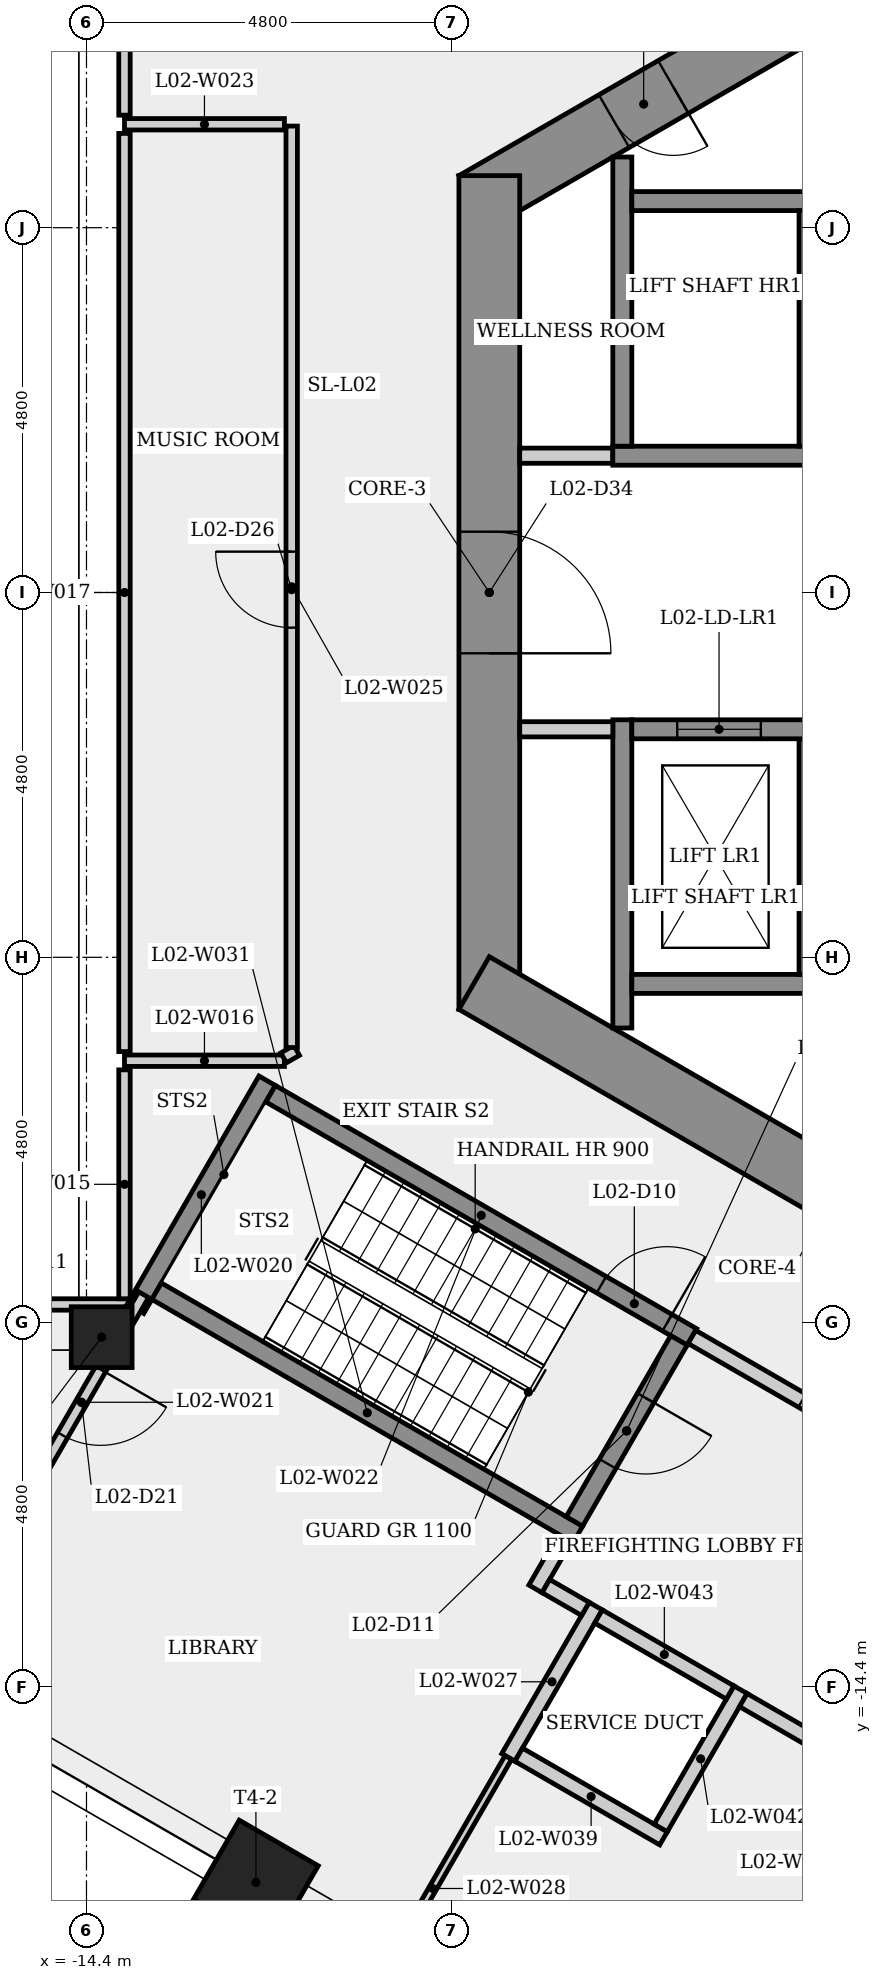
"""IFC4 building model, lengths in metres.
Left out: names, types, materials, properties, quantities, classifications, styles, units other than length and angle.
Written with IfcOpenShell. Run it as: python <this file> out.ifc"""

import sys

from ifc_helpers import new_model, si_unit, direction, frame, frame_2d, origin, origin_2d, place, context, subcontext, project, spatial, rectangle, extrude, element, fill, save


model = new_model("IFC4")
c1 = context("Model", 3, precision=1e-05, world=origin(), true_north=direction((0.0, 1.0)))
c2 = subcontext(c1, "Body", "Model", "MODEL_VIEW")
j1 = project(units=[si_unit("LENGTHUNIT", "METRE"), si_unit("PLANEANGLEUNIT", "RADIAN")], contexts=[c1])
p1 = place(None, origin())
s1 = spatial("IfcSite", under=j1, at=p1, CompositionType="ELEMENT")
p2 = place(p1, origin())
s2 = spatial("IfcBuilding", under=s1, at=p2, CompositionType="ELEMENT")
p3 = place(p2, frame((0.0, 0.0, 11.5)))
s3 = spatial("IfcBuildingStorey", under=s2, at=p3, CompositionType="ELEMENT", Elevation=11.5)
p4 = place(p3, frame((0.2, 10.623, 0.0), z_axis=(0.0, 0.0, 1.0), x_axis=(-0.866023993627, -0.500002442456, 0.0)))
e1 = element("IfcWall", 1, at=p4, inside=s3, PredefinedType="SHEAR", context=c2, shape_type="SweptSolid", body=[
    extrude(rectangle(XDim=10.97, YDim=0.8, at=frame_2d((5.485, 0.0))), origin(), (0.0, 0.0, 1.0), 4.5),
])
p5 = place(p4, frame((7.944, 0.0, 0.0)))
e2 = element("IfcOpeningElement", 2, at=p5, cuts=e1, PredefinedType="OPENING", context=c2, shape_type="SweptSolid", body=[
    extrude(rectangle(XDim=0.9, YDim=2.1, at=frame_2d((0.45, 1.05))), frame((0.0, 0.41, 0.0), z_axis=(0.0, -1.0, 0.0), x_axis=(1.0, 0.0, 0.0)), (0.0, 0.0, 1.0), 0.82),
])
p6 = place(p4, frame((1.86, 0.0, 0.0)))
e3 = element("IfcOpeningElement", 3, at=p6, cuts=e1, PredefinedType="OPENING", context=c2, shape_type="SweptSolid", body=[
    extrude(rectangle(XDim=0.9, YDim=2.1, at=frame_2d((0.45, 1.05))), frame((0.0, 0.41, 0.0), z_axis=(0.0, -1.0, 0.0), x_axis=(1.0, 0.0, 0.0)), (0.0, 0.0, 1.0), 0.82),
])
p7 = place(p3, frame((-9.1, 5.485, 0.0), z_axis=(0.0, 0.0, 1.0), x_axis=(0.0, -1.0, 0.0)))
e4 = element("IfcWall", 4, at=p7, inside=s3, PredefinedType="SHEAR", context=c2, shape_type="SweptSolid", body=[
    extrude(rectangle(XDim=10.97, YDim=0.8, at=frame_2d((5.485, 0.0))), origin(), (0.0, 0.0, 1.0), 4.5),
])
p8 = place(p7, frame((4.685, 0.0, 0.0)))
e5 = element("IfcOpeningElement", 5, at=p8, cuts=e4, PredefinedType="OPENING", context=c2, shape_type="SweptSolid", body=[
    extrude(rectangle(XDim=1.6, YDim=2.1, at=frame_2d((0.8, 1.05))), frame((0.0, 0.41, 0.0), z_axis=(0.0, -1.0, 0.0), x_axis=(1.0, 0.0, 0.0)), (0.0, 0.0, 1.0), 0.82),
])
p9 = place(p3, frame((-9.3, -5.138, 0.0), z_axis=(0.0, 0.0, 1.0), x_axis=(0.866023993627, -0.500002442456, 0.0)))
e6 = element("IfcWall", 6, at=p9, inside=s3, PredefinedType="SHEAR", context=c2, shape_type="SweptSolid", body=[
    extrude(rectangle(XDim=10.97, YDim=0.8, at=frame_2d((5.485, 0.0))), origin(), (0.0, 0.0, 1.0), 4.5),
])
p10 = place(p9, frame((5.74, 0.0, 0.0)))
e7 = element("IfcOpeningElement", 7, at=p10, cuts=e6, PredefinedType="OPENING", context=c2, shape_type="SweptSolid", body=[
    extrude(rectangle(XDim=0.9, YDim=2.1, at=frame_2d((0.45, 1.05))), frame((0.0, 0.41, 0.0), z_axis=(0.0, -1.0, 0.0), x_axis=(1.0, 0.0, 0.0)), (0.0, 0.0, 1.0), 0.82),
])
p11 = place(p3, frame((-12.171, -16.973, 0.0), z_axis=(0.0, 0.0, 1.0), x_axis=(-0.5, -0.866025403784, 0.0)))
e8 = element("IfcColumn", 8, at=p11, inside=s3, PredefinedType="COLUMN", context=c2, shape_type="SweptSolid", body=[
    extrude(rectangle(XDim=1.2, YDim=1.2, at=origin_2d()), origin(), (0.0, 0.0, 1.0), 4.5),
])
p12 = place(p3, frame((-14.2, -9.798, 0.0), z_axis=(0.0, 0.0, 1.0), x_axis=(-1.0, 0.0, 0.0)))
e9 = element("IfcColumn", 9, at=p12, inside=s3, PredefinedType="COLUMN", context=c2, shape_type="SweptSolid", body=[
    extrude(rectangle(XDim=0.8, YDim=0.8, at=origin_2d()), origin(), (0.0, 0.0, 1.0), 4.5),
])
p13 = place(p3, frame((-16.78, -9.368, 0.0), z_axis=(0.0, 0.0, 1.0), x_axis=(1.0, 0.0, 0.0)))
e10 = element("IfcWall", 10, at=p13, inside=s3, PredefinedType="PARTITIONING", context=c2, shape_type="SweptSolid", body=[
    extrude(rectangle(XDim=2.955, YDim=0.15, at=frame_2d((1.478, 0.0))), origin(), (0.0, 0.0, 1.0), 3.175),
])
p14 = place(p3, frame((-13.9, -9.293, 0.0), z_axis=(0.0, 0.0, 1.0), x_axis=(0.0, 1.0, 0.0)))
e11 = element("IfcWall", 11, at=p14, inside=s3, PredefinedType="PARTITIONING", context=c2, shape_type="SweptSolid", body=[
    extrude(rectangle(XDim=3.012, YDim=0.15, at=frame_2d((1.506, 0.0))), origin(), (0.0, 0.0, 1.0), 3.175),
])
p15 = place(p3, frame((-13.9, -6.161, 0.0), z_axis=(0.0, 0.0, 1.0), x_axis=(1.0, 0.0, 0.0)))
e12 = element("IfcWall", 12, at=p15, inside=s3, PredefinedType="PARTITIONING", context=c2, shape_type="SweptSolid", body=[
    extrude(rectangle(XDim=2.104, YDim=0.15, at=frame_2d((1.052, 0.0))), origin(), (0.0, 0.0, 1.0), 4.1),
])
p16 = place(p3, frame((-13.9, -6.041, 0.0), z_axis=(0.0, 0.0, 1.0), x_axis=(0.0, 1.0, 0.0)))
e13 = element("IfcWall", 13, at=p16, inside=s3, PredefinedType="PARTITIONING", context=c2, shape_type="SweptSolid", body=[
    extrude(rectangle(XDim=12.082, YDim=0.15, at=frame_2d((6.041, 0.0))), origin(), (0.0, 0.0, 1.0), 3.175),
])
p17 = place(p3, frame((-13.9, 6.281, 0.0), z_axis=(0.0, 0.0, 1.0), x_axis=(0.0, 1.0, 0.0)))
e14 = element("IfcWall", 14, at=p17, inside=s3, PredefinedType="PARTITIONING", context=c2, shape_type="SweptSolid", body=[
    extrude(rectangle(XDim=3.162, YDim=0.15, at=frame_2d((1.581, 0.0))), origin(), (0.0, 0.0, 1.0), 3.175),
])
p18 = place(p3, frame((-13.755, -9.424, 0.0), z_axis=(0.0, 0.0, 1.0), x_axis=(0.500005140434, 0.866022435933, 0.0)))
e15 = element("IfcWall", 15, at=p18, inside=s3, PredefinedType="SHEAR", context=c2, shape_type="SweptSolid", body=[
    extrude(rectangle(XDim=3.464, YDim=0.25, at=frame_2d((1.732, 0.0))), origin(), (0.0, 0.0, 1.0), 4.1),
])
p19 = place(p3, frame((-13.648, -9.239, 0.0), z_axis=(0.0, 0.0, 1.0), x_axis=(-0.50004125829, -0.866001581989, 0.0)))
e16 = element("IfcWall", 16, at=p19, inside=s3, PredefinedType="PARTITIONING", context=c2, shape_type="SweptSolid", body=[
    extrude(rectangle(XDim=3.27, YDim=0.15, at=frame_2d((1.635, 0.0))), origin(), (0.0, 0.0, 1.0), 4.1),
])
p20 = place(p19, frame((1.135, 0.0, 0.0)))
e17 = element("IfcOpeningElement", 17, at=p20, cuts=e16, PredefinedType="OPENING", context=c2, shape_type="SweptSolid", body=[
    extrude(rectangle(XDim=1.0, YDim=2.1, at=frame_2d((0.5, 1.05))), frame((0.0, 0.085, 0.0), z_axis=(0.0, -1.0, 0.0), x_axis=(1.0, 0.0, 0.0)), (0.0, 0.0, 1.0), 0.17),
])
p21 = place(p3, frame((-11.977, -6.595, 0.0), z_axis=(0.0, 0.0, 1.0), x_axis=(0.866025499775, -0.499999833739, 0.0)))
e18 = element("IfcWall", 18, at=p21, inside=s3, PredefinedType="SHEAR", context=c2, shape_type="SweptSolid", body=[
    extrude(rectangle(XDim=6.4, YDim=0.25, at=frame_2d((3.2, 0.0))), origin(), (0.0, 0.0, 1.0), 4.1),
])
p22 = place(p21, frame((5.025, 0.0, 0.0)))
e19 = element("IfcOpeningElement", 19, at=p22, cuts=e18, PredefinedType="OPENING", context=c2, shape_type="SweptSolid", body=[
    extrude(rectangle(XDim=1.0, YDim=2.1, at=frame_2d((0.5, 1.05))), frame((0.0, 0.135, 0.0), z_axis=(0.0, -1.0, 0.0), x_axis=(1.0, 0.0, 0.0)), (0.0, 0.0, 1.0), 0.27),
])
p23 = place(p3, frame((-11.796, 6.161, 0.0), z_axis=(0.0, 0.0, 1.0), x_axis=(-1.0, 0.0, 0.0)))
e20 = element("IfcWall", 20, at=p23, inside=s3, PredefinedType="PARTITIONING", context=c2, shape_type="SweptSolid", body=[
    extrude(rectangle(XDim=2.104, YDim=0.15, at=frame_2d((1.052, 0.0))), origin(), (0.0, 0.0, 1.0), 4.1),
])
p24 = place(p3, frame((-11.806, -6.123, 0.0), z_axis=(0.0, 0.0, 1.0), x_axis=(0.866103179807, 0.499865263774, 0.0)))
e21 = element("IfcWall", 21, at=p24, inside=s3, PredefinedType="PARTITIONING", context=c2, shape_type="SweptSolid", body=[
    extrude(rectangle(XDim=0.197, YDim=0.15, at=frame_2d((0.099, 0.0))), origin(), (0.0, 0.0, 1.0), 4.1),
])
p25 = place(p3, frame((-11.7, -5.987, 0.0), z_axis=(0.0, 0.0, 1.0), x_axis=(0.0, 1.0, 0.0)))
e22 = element("IfcWall", 22, at=p25, inside=s3, PredefinedType="PARTITIONING", context=c2, shape_type="SweptSolid", body=[
    extrude(rectangle(XDim=12.125, YDim=0.15, at=frame_2d((6.062, 0.0))), origin(), (0.0, 0.0, 1.0), 4.1),
])
p26 = place(p25, frame((5.525, 0.0, 0.0)))
e23 = element("IfcOpeningElement", 23, at=p26, cuts=e22, PredefinedType="OPENING", context=c2, shape_type="SweptSolid", body=[
    extrude(rectangle(XDim=1.0, YDim=2.1, at=frame_2d((0.5, 1.05))), frame((0.0, 0.085, 0.0), z_axis=(0.0, -1.0, 0.0), x_axis=(1.0, 0.0, 0.0)), (0.0, 0.0, 1.0), 0.17),
])
p27 = place(p3, frame((-8.85, -15.329, 0.0), z_axis=(0.0, 0.0, 1.0), x_axis=(0.500077740698, 0.865980515519, 0.0)))
e24 = element("IfcWall", 24, at=p27, inside=s3, PredefinedType="PLUMBINGWALL", context=c2, shape_type="SweptSolid", body=[
    extrude(rectangle(XDim=2.3, YDim=0.2, at=frame_2d((1.15, 0.0))), origin(), (0.0, 0.0, 1.0), 4.1),
])
p28 = place(p3, frame((-8.85, -15.329, 0.0), z_axis=(0.0, 0.0, 1.0), x_axis=(-0.499991453095, -0.866030338286, 0.0)))
e25 = element("IfcWall", 25, at=p28, inside=s3, PredefinedType="PARTITIONING", context=c2, shape_type="SweptSolid", body=[
    extrude(rectangle(XDim=3.98, YDim=0.1, at=frame_2d((1.99, 0.0))), origin(), (0.0, 0.0, 1.0), 4.1),
])
p29 = place(p3, frame((-8.7, 1.8, 0.0), z_axis=(0.0, 0.0, 1.0), x_axis=(1.0, 0.0, 0.0)))
e26 = element("IfcWall", 26, at=p29, inside=s3, PredefinedType="PARTITIONING", context=c2, shape_type="SweptSolid", body=[
    extrude(rectangle(XDim=1.225, YDim=0.2, at=frame_2d((0.613, 0.0))), origin(), (0.0, 0.0, 1.0), 4.1),
])
p30 = place(p3, frame((-8.493, -13.11, 0.0), z_axis=(0.0, 0.0, 1.0), x_axis=(0.500067724834, 0.865986299303, 0.0)))
e27 = element("IfcWall", 27, at=p30, inside=s3, PredefinedType="PARTITIONING", context=c2, shape_type="SweptSolid", body=[
    extrude(rectangle(XDim=0.775, YDim=0.2, at=frame_2d((0.388, 0.0))), origin(), (0.0, 0.0, 1.0), 4.1),
])
p31 = place(p3, frame((-7.935, -12.393, 0.0), z_axis=(0.0, 0.0, 1.0), x_axis=(-0.866025499775, 0.499999833739, 0.0)))
e28 = element("IfcWall", 28, at=p31, inside=s3, PredefinedType="SHEAR", context=c2, shape_type="SweptSolid", body=[
    extrude(rectangle(XDim=6.4, YDim=0.25, at=frame_2d((3.2, 0.0))), origin(), (0.0, 0.0, 1.0), 4.1),
])
p32 = place(p3, frame((-7.836, -13.373, 0.0), z_axis=(0.0, 0.0, 1.0), x_axis=(-0.866232998003, 0.499640263761, 0.0)))
e29 = element("IfcWall", 29, at=p32, inside=s3, PredefinedType="PARTITIONING", context=c2, shape_type="SweptSolid", body=[
    extrude(rectangle(XDim=0.6, YDim=0.2, at=frame_2d((0.3, 0.0))), origin(), (0.0, 0.0, 1.0), 4.1),
])
p33 = place(p3, frame((-7.475, 1.8, 0.0), z_axis=(0.0, 0.0, 1.0), x_axis=(1.0, 0.0, 0.0)))
e30 = element("IfcWall", 30, at=p33, inside=s3, PredefinedType="SHEAR", context=c2, shape_type="SweptSolid", body=[
    extrude(rectangle(XDim=14.95, YDim=0.25, at=frame_2d((7.475, 0.0))), origin(), (0.0, 0.0, 1.0), 4.1),
])
p34 = place(p3, frame((-7.35, -5.73, 0.0), z_axis=(0.0, 0.0, 1.0), x_axis=(0.0, 1.0, 0.0)))
e31 = element("IfcWall", 31, at=p34, inside=s3, PredefinedType="SHEAR", context=c2, shape_type="SweptSolid", body=[
    extrude(rectangle(XDim=4.055, YDim=0.25, at=frame_2d((2.028, 0.0))), origin(), (0.0, 0.0, 1.0), 4.1),
])
p35 = place(p3, frame((-7.35, 1.925, 0.0), z_axis=(0.0, 0.0, 1.0), x_axis=(0.0, 1.0, 0.0)))
e32 = element("IfcWall", 32, at=p35, inside=s3, PredefinedType="SHEAR", context=c2, shape_type="SweptSolid", body=[
    extrude(rectangle(XDim=3.805, YDim=0.25, at=frame_2d((1.903, 0.0))), origin(), (0.0, 0.0, 1.0), 4.1),
])
p36 = place(p3, frame((-7.225, 5.15, 0.0), z_axis=(0.0, 0.0, 1.0), x_axis=(1.0, 0.0, 0.0)))
e33 = element("IfcWall", 33, at=p36, inside=s3, PredefinedType="SHEAR", context=c2, shape_type="SweptSolid", body=[
    extrude(rectangle(XDim=14.7, YDim=0.25, at=frame_2d((7.35, 0.0))), origin(), (0.0, 0.0, 1.0), 4.1),
])
p37 = place(p3, frame((-7.475, -1.8, 0.0), z_axis=(0.0, 0.0, 1.0), x_axis=(-1.0, 0.0, 0.0)))
e34 = element("IfcWall", 34, at=p37, inside=s3, PredefinedType="PARTITIONING", context=c2, shape_type="SweptSolid", body=[
    extrude(rectangle(XDim=1.225, YDim=0.2, at=frame_2d((0.613, 0.0))), origin(), (0.0, 0.0, 1.0), 4.1),
])
p38 = place(p3, frame((-6.808, -16.392, 0.0), z_axis=(0.0, 0.0, 1.0), x_axis=(-0.866008176907, 0.50002983664, 0.0)))
e35 = element("IfcWall", 35, at=p38, inside=s3, PredefinedType="PLUMBINGWALL", context=c2, shape_type="SweptSolid", body=[
    extrude(rectangle(XDim=2.2, YDim=0.2, at=frame_2d((1.1, 0.0))), origin(), (0.0, 0.0, 1.0), 4.1),
])
p39 = place(p3, frame((-6.605, -9.841, 0.0), z_axis=(0.0, 0.0, 1.0), x_axis=(-0.499996545922, -0.866027397988, 0.0)))
e36 = element("IfcWall", 36, at=p39, inside=s3, PredefinedType="SHEAR", context=c2, shape_type="SweptSolid", body=[
    extrude(rectangle(XDim=2.75, YDim=0.25, at=frame_2d((1.375, 0.0))), origin(), (0.0, 0.0, 1.0), 4.1),
])
p40 = place(p39, frame((0.875, 0.0, 0.0)))
e37 = element("IfcOpeningElement", 37, at=p40, cuts=e36, PredefinedType="OPENING", context=c2, shape_type="SweptSolid", body=[
    extrude(rectangle(XDim=1.0, YDim=2.1, at=frame_2d((0.5, 1.05))), frame((0.0, 0.135, 0.0), z_axis=(0.0, -1.0, 0.0), x_axis=(1.0, 0.0, 0.0)), (0.0, 0.0, 1.0), 0.27),
])
p41 = place(p3, frame((-6.435, -9.795, 0.0), z_axis=(0.0, 0.0, 1.0), x_axis=(0.866012907634, -0.500021643343, 0.0)))
e38 = element("IfcWall", 38, at=p41, inside=s3, PredefinedType="PARTITIONING", context=c2, shape_type="SweptSolid", body=[
    extrude(rectangle(XDim=4.45, YDim=0.2, at=frame_2d((2.225, 0.0))), origin(), (0.0, 0.0, 1.0), 4.1),
])
p42 = place(p41, frame((1.675, 0.0, 0.0)))
e39 = element("IfcOpeningElement", 39, at=p42, cuts=e38, PredefinedType="OPENING", context=c2, shape_type="SweptSolid", body=[
    extrude(rectangle(XDim=1.1, YDim=2.1, at=frame_2d((0.55, 1.05))), frame((0.0, 0.11, 0.0), z_axis=(0.0, -1.0, 0.0), x_axis=(1.0, 0.0, 0.0)), (0.0, 0.0, 1.0), 0.22),
])
p43 = place(p3, frame((-5.795, -14.437, 0.0), z_axis=(0.0, 0.0, 1.0), x_axis=(-0.500027713859, -0.866009402589, 0.0)))
e40 = element("IfcWall", 40, at=p43, inside=s3, PredefinedType="PLUMBINGWALL", context=c2, shape_type="SweptSolid", body=[
    extrude(rectangle(XDim=2.1, YDim=0.2, at=frame_2d((1.05, 0.0))), origin(), (0.0, 0.0, 1.0), 4.1),
])
p44 = place(p3, frame((-5.931, -14.473, 0.0), z_axis=(0.0, 0.0, 1.0), x_axis=(-0.866041268327, 0.499972520799, 0.0)))
e41 = element("IfcWall", 41, at=p44, inside=s3, PredefinedType="PLUMBINGWALL", context=c2, shape_type="SweptSolid", body=[
    extrude(rectangle(XDim=2.0, YDim=0.2, at=frame_2d((1.0, 0.0))), origin(), (0.0, 0.0, 1.0), 4.1),
])
p45 = place(p3, frame((-7.225, -5.15, 0.0), z_axis=(0.0, 0.0, 1.0), x_axis=(1.0, 0.0, 0.0)))
e42 = element("IfcWall", 42, at=p45, inside=s3, PredefinedType="SHEAR", context=c2, shape_type="SweptSolid", body=[
    extrude(rectangle(XDim=14.7, YDim=0.25, at=frame_2d((7.35, 0.0))), origin(), (0.0, 0.0, 1.0), 4.1),
])
for number, where, z_axis, x_axis in (
    (43, (-4.9, -1.925, 0.0), (0.0, 0.0, 1.0), (0.0, -1.0, 0.0)),
    (44, (-4.9, 5.025, 0.0), (0.0, 0.0, 1.0), (0.0, -1.0, 0.0)),
):
    element("IfcWall", number, at=place(p3, frame(where, z_axis=z_axis, x_axis=x_axis)), inside=s3, PredefinedType="SHEAR", context=c2, shape_type="SweptSolid", body=[
        extrude(rectangle(XDim=3.1, YDim=0.25, at=frame_2d((1.55, 0.0))), origin(), (0.0, 0.0, 1.0), 4.5),
    ])
p46 = place(p3, frame((-7.225, -1.8, 0.0), z_axis=(0.0, 0.0, 1.0), x_axis=(1.0, 0.0, 0.0)))
e45 = element("IfcWall", 45, at=p46, inside=s3, PredefinedType="SHEAR", context=c2, shape_type="SweptSolid", body=[
    extrude(rectangle(XDim=14.7, YDim=0.25, at=frame_2d((7.35, 0.0))), origin(), (0.0, 0.0, 1.0), 4.1),
])
p47 = place(p46, frame((0.597, 0.0, 0.0)))
e46 = element("IfcOpeningElement", 46, at=p47, cuts=e45, PredefinedType="OPENING", context=c2, shape_type="SweptSolid", body=[
    extrude(rectangle(XDim=1.1, YDim=2.1, at=frame_2d((0.55, 1.05))), frame((0.0, 0.135, 0.0), z_axis=(0.0, -1.0, 0.0), x_axis=(1.0, 0.0, 0.0)), (0.0, 0.0, 1.0), 0.27),
])
p48 = place(p46, frame((3.0, 0.0, 0.0)))
e47 = element("IfcOpeningElement", 47, at=p48, cuts=e45, PredefinedType="OPENING", context=c2, shape_type="SweptSolid", body=[
    extrude(rectangle(XDim=1.1, YDim=2.1, at=frame_2d((0.55, 1.05))), frame((0.0, 0.135, 0.0), z_axis=(0.0, -1.0, 0.0), x_axis=(1.0, 0.0, 0.0)), (0.0, 0.0, 1.0), 0.27),
])
p49 = place(p46, frame((5.45, 0.0, 0.0)))
e48 = element("IfcOpeningElement", 48, at=p49, cuts=e45, PredefinedType="OPENING", context=c2, shape_type="SweptSolid", body=[
    extrude(rectangle(XDim=1.1, YDim=2.1, at=frame_2d((0.55, 1.05))), frame((0.0, 0.135, 0.0), z_axis=(0.0, -1.0, 0.0), x_axis=(1.0, 0.0, 0.0)), (0.0, 0.0, 1.0), 0.27),
])
p50 = place(p46, frame((7.9, 0.0, 0.0)))
e49 = element("IfcOpeningElement", 49, at=p50, cuts=e45, PredefinedType="OPENING", context=c2, shape_type="SweptSolid", body=[
    extrude(rectangle(XDim=1.1, YDim=2.1, at=frame_2d((0.55, 1.05))), frame((0.0, 0.135, 0.0), z_axis=(0.0, -1.0, 0.0), x_axis=(1.0, 0.0, 0.0)), (0.0, 0.0, 1.0), 0.27),
])
p51 = place(p46, frame((10.35, 0.0, 0.0)))
e50 = element("IfcOpeningElement", 50, at=p51, cuts=e45, PredefinedType="OPENING", context=c2, shape_type="SweptSolid", body=[
    extrude(rectangle(XDim=1.1, YDim=2.1, at=frame_2d((0.55, 1.05))), frame((0.0, 0.135, 0.0), z_axis=(0.0, -1.0, 0.0), x_axis=(1.0, 0.0, 0.0)), (0.0, 0.0, 1.0), 0.27),
])
p52 = place(p3, frame((-4.286, -15.423, 0.0), z_axis=(0.0, 0.0, 1.0), x_axis=(-0.866025371046, 0.500000056704, 0.0)))
e51 = element("IfcWall", 51, at=p52, inside=s3, PredefinedType="PARTITIONING", context=c2, shape_type="SweptSolid", body=[
    extrude(rectangle(XDim=1.7, YDim=0.2, at=frame_2d((0.85, 0.0))), origin(), (0.0, 0.0, 1.0), 4.1),
])
p53 = place(p47, origin())
e52 = element("IfcDoor", 52, at=p53, inside=s3, OperationType="SLIDING_TO_LEFT", PredefinedType="DOOR", context=c2, shape_type="SweptSolid", body=[
    extrude(rectangle(XDim=1.1, YDim=2.1, at=frame_2d((0.55, 1.05))), frame((0.0, 0.025, 0.0), z_axis=(0.0, -1.0, 0.0), x_axis=(1.0, 0.0, 0.0)), (0.0, 0.0, 1.0), 0.05),
])
fill(e46, e52)
p54 = place(p22, origin())
e53 = element("IfcDoor", 53, at=p54, inside=s3, OperationType="SINGLE_SWING_RIGHT", PredefinedType="DOOR", context=c2, shape_type="SweptSolid", body=[
    extrude(rectangle(XDim=1.0, YDim=2.1, at=frame_2d((0.5, 1.05))), frame((0.0, 0.025, 0.0), z_axis=(0.0, -1.0, 0.0), x_axis=(1.0, 0.0, 0.0)), (0.0, 0.0, 1.0), 0.05),
])
fill(e19, e53)
p55 = place(p40, origin())
e54 = element("IfcDoor", 54, at=p55, inside=s3, OperationType="SINGLE_SWING_LEFT", PredefinedType="DOOR", context=c2, shape_type="SweptSolid", body=[
    extrude(rectangle(XDim=1.0, YDim=2.1, at=frame_2d((0.5, 1.05))), frame((0.0, 0.025, 0.0), z_axis=(0.0, -1.0, 0.0), x_axis=(1.0, 0.0, 0.0)), (0.0, 0.0, 1.0), 0.05),
])
fill(e37, e54)
p56 = place(p42, origin())
e55 = element("IfcDoor", 55, at=p56, inside=s3, OperationType="SINGLE_SWING_RIGHT", PredefinedType="DOOR", context=c2, shape_type="SweptSolid", body=[
    extrude(rectangle(XDim=1.1, YDim=2.1, at=frame_2d((0.55, 1.05))), frame((0.0, 0.025, 0.0), z_axis=(0.0, -1.0, 0.0), x_axis=(1.0, 0.0, 0.0)), (0.0, 0.0, 1.0), 0.05),
])
fill(e39, e55)
p57 = place(p20, origin())
e56 = element("IfcDoor", 56, at=p57, inside=s3, OperationType="SINGLE_SWING_LEFT", PredefinedType="DOOR", context=c2, shape_type="SweptSolid", body=[
    extrude(rectangle(XDim=1.0, YDim=2.1, at=frame_2d((0.5, 1.05))), frame((0.0, 0.025, 0.0), z_axis=(0.0, -1.0, 0.0), x_axis=(1.0, 0.0, 0.0)), (0.0, 0.0, 1.0), 0.05),
])
fill(e17, e56)
p58 = place(p26, origin())
e57 = element("IfcDoor", 57, at=p58, inside=s3, OperationType="SINGLE_SWING_RIGHT", PredefinedType="DOOR", context=c2, shape_type="SweptSolid", body=[
    extrude(rectangle(XDim=1.0, YDim=2.1, at=frame_2d((0.5, 1.05))), frame((0.0, 0.025, 0.0), z_axis=(0.0, -1.0, 0.0), x_axis=(1.0, 0.0, 0.0)), (0.0, 0.0, 1.0), 0.05),
])
fill(e23, e57)
p59 = place(p5, origin())
e58 = element("IfcDoor", 58, at=p59, inside=s3, OperationType="SINGLE_SWING_LEFT", PredefinedType="DOOR", context=c2, shape_type="SweptSolid", body=[
    extrude(rectangle(XDim=0.9, YDim=2.1, at=frame_2d((0.45, 1.05))), frame((0.0, 0.025, 0.0), z_axis=(0.0, -1.0, 0.0), x_axis=(1.0, 0.0, 0.0)), (0.0, 0.0, 1.0), 0.05),
])
fill(e2, e58)
p60 = place(p8, origin())
e59 = element("IfcDoor", 59, at=p60, inside=s3, OperationType="SINGLE_SWING_RIGHT", PredefinedType="DOOR", context=c2, shape_type="SweptSolid", body=[
    extrude(rectangle(XDim=1.6, YDim=2.1, at=frame_2d((0.8, 1.05))), frame((0.0, 0.025, 0.0), z_axis=(0.0, -1.0, 0.0), x_axis=(1.0, 0.0, 0.0)), (0.0, 0.0, 1.0), 0.05),
])
fill(e5, e59)
save(model, sys.argv[1])
